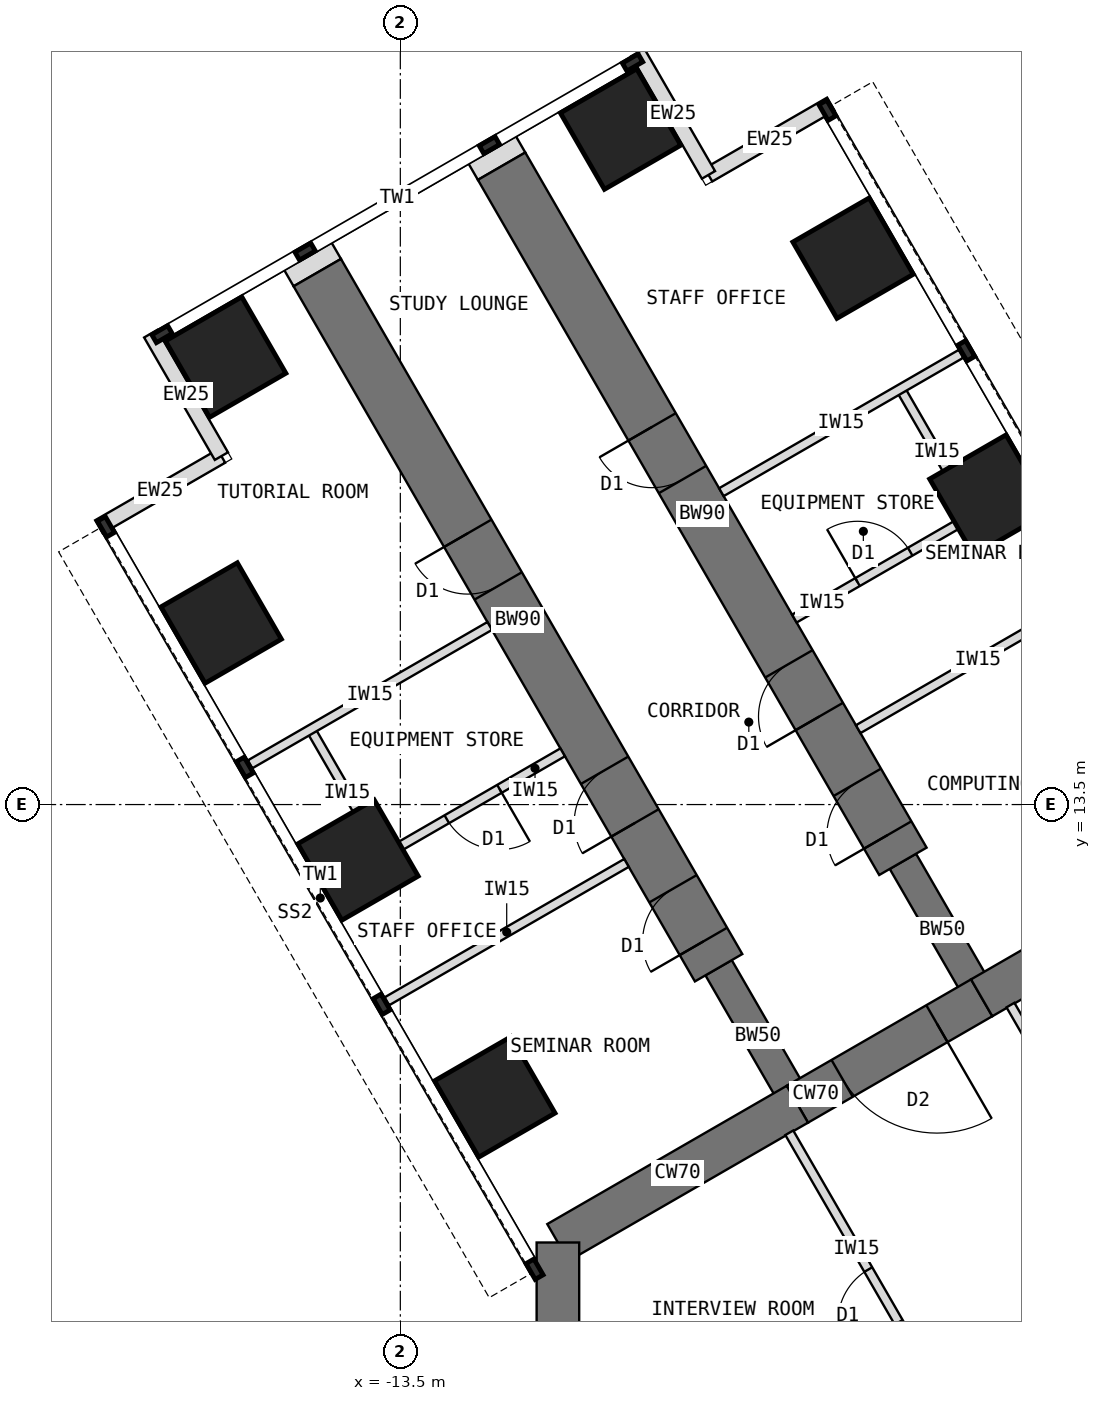
"""IFC4 building model, lengths in metres.
Left out: names, types, materials, properties, quantities, classifications, styles, units other than length and angle.
Written with IfcOpenShell. Run it as: python <this file> out.ifc"""

import sys

from ifc_helpers import new_model, si_unit, direction, frame, frame_2d, origin, origin_2d, place, context, subcontext, project, spatial, rectangle, extrude, element, fill, save


model = new_model("IFC4")
c1 = context("Model", 3, precision=1e-05, world=origin(), true_north=direction((0.0, 1.0)))
c2 = subcontext(c1, "Body", "Model", "MODEL_VIEW")
j1 = project(units=[si_unit("LENGTHUNIT", "METRE"), si_unit("PLANEANGLEUNIT", "RADIAN")], contexts=[c1])
p1 = place(None, origin())
s1 = spatial("IfcSite", under=j1, at=p1, CompositionType="ELEMENT")
p2 = place(p1, origin())
s2 = spatial("IfcBuilding", under=s1, at=p2, CompositionType="ELEMENT")
p3 = place(p2, frame((0.0, 0.0, 64.5)))
s3 = spatial("IfcBuildingStorey", under=s2, at=p3, CompositionType="ELEMENT", Elevation=64.5)
p4 = place(p3, frame((0.0, 12.596, 0.0), z_axis=(0.0, 0.0, 1.0), x_axis=(-0.866011268655, -0.500024481964, 0.0)))
e1 = element("IfcWall", 1, at=p4, inside=s3, PredefinedType="SHEAR", context=c2, shape_type="SweptSolid", body=[
    extrude(rectangle(XDim=4.548, YDim=0.7, at=frame_2d((2.274, 0.0))), origin(), (0.0, 0.0, 1.0), 4.0),
])
p5 = place(p3, frame((-3.939, 10.322, 0.0), z_axis=(0.0, 0.0, 1.0), x_axis=(-0.866019471182, -0.500010275428, 0.0)))
e2 = element("IfcWall", 2, at=p5, inside=s3, PredefinedType="SHEAR", context=c2, shape_type="SweptSolid", body=[
    extrude(rectangle(XDim=3.5, YDim=0.7, at=frame_2d((1.75, 0.0))), origin(), (0.0, 0.0, 1.0), 4.0),
])
p6 = place(p5, frame((0.85, 0.0, 0.0)))
e3 = element("IfcOpeningElement", 3, at=p6, cuts=e2, PredefinedType="OPENING", context=c2, shape_type="SweptSolid", body=[
    extrude(rectangle(XDim=1.8, YDim=2.1, at=frame_2d((0.9, 1.05))), frame((0.0, 0.36, 0.0), z_axis=(0.0, -1.0, 0.0), x_axis=(1.0, 0.0, 0.0)), (0.0, 0.0, 1.0), 0.72),
])
p7 = place(p3, frame((-6.97, 8.572, 0.0), z_axis=(0.0, 0.0, 1.0), x_axis=(-0.866034513004, -0.499984222037, 0.0)))
e4 = element("IfcWall", 4, at=p7, inside=s3, PredefinedType="SHEAR", context=c2, shape_type="SweptSolid", body=[
    extrude(rectangle(XDim=4.548, YDim=0.7, at=frame_2d((2.274, 0.0))), origin(), (0.0, 0.0, 1.0), 4.0),
])
p8 = place(p3, frame((-10.908, 6.298, 0.0), z_axis=(0.0, 0.0, 1.0), x_axis=(0.0, -1.0, 0.0)))
e5 = element("IfcWall", 5, at=p8, inside=s3, PredefinedType="SHEAR", context=c2, shape_type="SweptSolid", body=[
    extrude(rectangle(XDim=12.596, YDim=0.7, at=frame_2d((6.298, 0.0))), origin(), (0.0, 0.0, 1.0), 4.0),
])
p9 = place(p3, frame((-6.97, 8.572, 0.0), z_axis=(0.0, 0.0, 1.0), x_axis=(-0.499988811324, 0.866031863473, 0.0)))
e6 = element("IfcWall", 6, at=p9, inside=s3, PredefinedType="SHEAR", context=c2, shape_type="SweptSolid", body=[
    extrude(rectangle(XDim=2.592, YDim=0.5, at=frame_2d((1.296, 0.0))), origin(), (0.0, 0.0, 1.0), 4.0),
])
p10 = place(p3, frame((-8.266, 10.816, 0.0), z_axis=(0.0, 0.0, 1.0), x_axis=(-0.499996231654, 0.866027579429, 0.0)))
e7 = element("IfcWall", 7, at=p10, inside=s3, PredefinedType="SHEAR", context=c2, shape_type="SweptSolid", body=[
    extrude(rectangle(XDim=13.2, YDim=0.9, at=frame_2d((6.6, 0.0))), origin(), (0.0, 0.0, 1.0), 4.0),
])
p11 = place(p10, frame((0.5, 0.0, 0.0)))
e8 = element("IfcOpeningElement", 8, at=p11, cuts=e7, PredefinedType="OPENING", context=c2, shape_type="SweptSolid", body=[
    extrude(rectangle(XDim=1.0, YDim=2.1, at=frame_2d((0.5, 1.05))), frame((0.0, 0.46, 0.0), z_axis=(0.0, -1.0, 0.0), x_axis=(1.0, 0.0, 0.0)), (0.0, 0.0, 1.0), 0.92),
])
p12 = place(p10, frame((2.75, 0.0, 0.0)))
e9 = element("IfcOpeningElement", 9, at=p12, cuts=e7, PredefinedType="OPENING", context=c2, shape_type="SweptSolid", body=[
    extrude(rectangle(XDim=1.0, YDim=2.1, at=frame_2d((0.5, 1.05))), frame((0.0, 0.46, 0.0), z_axis=(0.0, -1.0, 0.0), x_axis=(1.0, 0.0, 0.0)), (0.0, 0.0, 1.0), 0.92),
])
p13 = place(p10, frame((7.25, 0.0, 0.0)))
e10 = element("IfcOpeningElement", 10, at=p13, cuts=e7, PredefinedType="OPENING", context=c2, shape_type="SweptSolid", body=[
    extrude(rectangle(XDim=1.0, YDim=2.1, at=frame_2d((0.5, 1.05))), frame((0.0, 0.46, 0.0), z_axis=(0.0, -1.0, 0.0), x_axis=(1.0, 0.0, 0.0)), (0.0, 0.0, 1.0), 0.92),
])
p14 = place(p3, frame((-3.939, 10.322, 0.0), z_axis=(0.0, 0.0, 1.0), x_axis=(-0.499918158782, 0.866072649678, 0.0)))
e11 = element("IfcWall", 11, at=p14, inside=s3, PredefinedType="SHEAR", context=c2, shape_type="SweptSolid", body=[
    extrude(rectangle(XDim=2.592, YDim=0.5, at=frame_2d((1.296, 0.0))), origin(), (0.0, 0.0, 1.0), 4.0),
])
p15 = place(p3, frame((-5.234, 12.566, 0.0), z_axis=(0.0, 0.0, 1.0), x_axis=(-0.500010103361, 0.866019570528, 0.0)))
e12 = element("IfcWall", 12, at=p15, inside=s3, PredefinedType="SHEAR", context=c2, shape_type="SweptSolid", body=[
    extrude(rectangle(XDim=13.2, YDim=0.9, at=frame_2d((6.6, 0.0))), origin(), (0.0, 0.0, 1.0), 4.0),
])
p16 = place(p15, frame((0.5, 0.0, 0.0)))
e13 = element("IfcOpeningElement", 13, at=p16, cuts=e12, PredefinedType="OPENING", context=c2, shape_type="SweptSolid", body=[
    extrude(rectangle(XDim=1.0, YDim=2.1, at=frame_2d((0.5, 1.05))), frame((0.0, 0.46, 0.0), z_axis=(0.0, -1.0, 0.0), x_axis=(1.0, 0.0, 0.0)), (0.0, 0.0, 1.0), 0.92),
])
p17 = place(p15, frame((2.75, 0.0, 0.0)))
e14 = element("IfcOpeningElement", 14, at=p17, cuts=e12, PredefinedType="OPENING", context=c2, shape_type="SweptSolid", body=[
    extrude(rectangle(XDim=1.0, YDim=2.1, at=frame_2d((0.5, 1.05))), frame((0.0, 0.46, 0.0), z_axis=(0.0, -1.0, 0.0), x_axis=(1.0, 0.0, 0.0)), (0.0, 0.0, 1.0), 0.92),
])
p18 = place(p15, frame((7.25, 0.0, 0.0)))
e15 = element("IfcOpeningElement", 15, at=p18, cuts=e12, PredefinedType="OPENING", context=c2, shape_type="SweptSolid", body=[
    extrude(rectangle(XDim=1.0, YDim=2.1, at=frame_2d((0.5, 1.05))), frame((0.0, 0.46, 0.0), z_axis=(0.0, -1.0, 0.0), x_axis=(1.0, 0.0, 0.0)), (0.0, 0.0, 1.0), 0.92),
])
for number, where, z_axis, x_axis in (
    (16, (-11.946, 8.691, 0.0), (0.0, 0.0, 1.0), (0.866, 0.5, 0.0)),
    (17, (-14.196, 12.588, 0.0), (0.0, 0.0, 1.0), (0.866, 0.5, 0.0)),
    (18, (-3.804, 18.588, 0.0), (0.0, 0.0, 1.0), (0.866, 0.5, 0.0)),
    (19, (-16.446, 16.486, 0.0), (0.0, 0.0, 1.0), (0.866, 0.5, 0.0)),
    (20, (-6.054, 22.486, 0.0), (0.0, 0.0, 1.0), (0.866, 0.5, 0.0)),
    (21, (-16.373, 20.858, 0.0), (0.0, 0.0, 1.0), (0.866, 0.5, 0.0)),
    (22, (-9.877, 24.608, 0.0), (0.0, 0.0, 1.0), (0.866, 0.5, 0.0)),
):
    element("IfcColumn", number, at=place(p3, frame(where, z_axis=z_axis, x_axis=x_axis)), inside=s3, PredefinedType="COLUMN", context=c2, shape_type="SweptSolid", body=[
        extrude(rectangle(XDim=1.45, YDim=1.45, at=origin_2d()), origin(), (0.0, 0.0, 1.0), 4.0),
    ])
for number, where, z_axis, x_axis in (
    (23, (-18.456, 18.067, 0.0), (0.0, 0.0, 1.0), (0.866, 0.5, 0.0)),
    (24, (-16.443, 19.23, 0.0), (0.0, 0.0, 1.0), (-0.5, 0.866, 0.0)),
    (25, (-6.419, 25.017, 0.0), (0.0, 0.0, 1.0), (-0.866, -0.5, 0.0)),
    (26, (-8.432, 23.855, 0.0), (0.0, 0.0, 1.0), (-0.5, 0.866, 0.0)),
):
    element("IfcWall", number, at=place(p3, frame(where, z_axis=z_axis, x_axis=x_axis)), inside=s3, PredefinedType="STANDARD", context=c2, shape_type="SweptSolid", body=[
        extrude(rectangle(XDim=2.325, YDim=0.25, at=frame_2d((1.163, 0.0))), origin(), (0.0, 0.0, 1.0), 3.8),
    ])
for number, where, z_axis, x_axis in (
    (27, (-14.865, 22.248, 0.0), (0.0, 0.0, 1.0), (-0.5, 0.866, 0.0)),
    (28, (-11.834, 23.998, 0.0), (0.0, 0.0, 1.0), (-0.5, 0.866, 0.0)),
):
    element("IfcWall", number, at=place(p3, frame(where, z_axis=z_axis, x_axis=x_axis)), inside=s3, PredefinedType="PARTITIONING", context=c2, shape_type="SweptSolid", body=[
        extrude(rectangle(XDim=0.31, YDim=0.9, at=frame_2d((0.155, 0.0))), origin(), (0.0, 0.0, 1.0), 3.8),
    ])
for number, where, z_axis, x_axis in (
    (29, (-9.78, 12.54, 0.0), (0.0, 0.0, 1.0), (-0.866, -0.5, 0.0)),
    (30, (-12.03, 16.437, 0.0), (0.0, 0.0, 1.0), (-0.866, -0.5, 0.0)),
):
    element("IfcWall", number, at=place(p3, frame(where, z_axis=z_axis, x_axis=x_axis)), inside=s3, PredefinedType="PARTITIONING", context=c2, shape_type="SweptSolid", body=[
        extrude(rectangle(XDim=4.55, YDim=0.15, at=frame_2d((2.275, 0.0))), origin(), (0.0, 0.0, 1.0), 3.8),
    ])
p19 = place(p3, frame((-13.775, 12.658, 0.0), z_axis=(0.0, 0.0, 1.0), x_axis=(-0.500033551112, 0.866006032174, 0.0)))
e31 = element("IfcWall", 31, at=p19, inside=s3, PredefinedType="PARTITIONING", context=c2, shape_type="SweptSolid", body=[
    extrude(rectangle(XDim=2.4, YDim=0.15, at=frame_2d((1.2, 0.0))), origin(), (0.0, 0.0, 1.0), 3.8),
])
p20 = place(p3, frame((-10.83, 14.359, 0.0), z_axis=(0.0, 0.0, 1.0), x_axis=(-0.865989465428, -0.500062241894, 0.0)))
e32 = element("IfcWall", 32, at=p20, inside=s3, PredefinedType="PARTITIONING", context=c2, shape_type="SweptSolid", body=[
    extrude(rectangle(XDim=3.4, YDim=0.15, at=frame_2d((1.7, 0.0))), origin(), (0.0, 0.0, 1.0), 3.8),
])
p21 = place(p20, frame((1.2, 0.0, 0.0)))
e33 = element("IfcOpeningElement", 33, at=p21, cuts=e32, PredefinedType="OPENING", context=c2, shape_type="SweptSolid", body=[
    extrude(rectangle(XDim=1.0, YDim=2.1, at=frame_2d((0.5, 1.05))), frame((0.0, 0.085, 0.0), z_axis=(0.0, -1.0, 0.0), x_axis=(1.0, 0.0, 0.0)), (0.0, 0.0, 1.0), 0.17),
])
for number, where, z_axis, x_axis in (
    (34, (-5.97, 14.74, 0.0), (0.0, 0.0, 1.0), (0.866, 0.5, 0.0)),
    (35, (-8.22, 18.637, 0.0), (0.0, 0.0, 1.0), (0.866, 0.5, 0.0)),
):
    element("IfcWall", number, at=place(p3, frame(where, z_axis=z_axis, x_axis=x_axis)), inside=s3, PredefinedType="PARTITIONING", context=c2, shape_type="SweptSolid", body=[
        extrude(rectangle(XDim=4.55, YDim=0.15, at=frame_2d((2.275, 0.0))), origin(), (0.0, 0.0, 1.0), 3.8),
    ])
p22 = place(p3, frame((-4.075, 18.259, 0.0), z_axis=(0.0, 0.0, 1.0), x_axis=(-0.500001309137, 0.866024647952, 0.0)))
e36 = element("IfcWall", 36, at=p22, inside=s3, PredefinedType="PARTITIONING", context=c2, shape_type="SweptSolid", body=[
    extrude(rectangle(XDim=2.4, YDim=0.15, at=frame_2d((1.2, 0.0))), origin(), (0.0, 0.0, 1.0), 3.8),
])
p23 = place(p3, frame((-7.02, 16.559, 0.0), z_axis=(0.0, 0.0, 1.0), x_axis=(0.866038511948, 0.499977295307, 0.0)))
e37 = element("IfcWall", 37, at=p23, inside=s3, PredefinedType="PARTITIONING", context=c2, shape_type="SweptSolid", body=[
    extrude(rectangle(XDim=3.4, YDim=0.15, at=frame_2d((1.7, 0.0))), origin(), (0.0, 0.0, 1.0), 3.8),
])
p24 = place(p23, frame((1.2, 0.0, 0.0)))
e38 = element("IfcOpeningElement", 38, at=p24, cuts=e37, PredefinedType="OPENING", context=c2, shape_type="SweptSolid", body=[
    extrude(rectangle(XDim=1.0, YDim=2.1, at=frame_2d((0.5, 1.05))), frame((0.0, 0.085, 0.0), z_axis=(0.0, -1.0, 0.0), x_axis=(1.0, 0.0, 0.0)), (0.0, 0.0, 1.0), 0.17),
])
p25 = place(p3, frame((-4.89, 4.27, 0.0), z_axis=(0.0, 0.0, 1.0), x_axis=(-0.500007369519, 0.866021148949, 0.0)))
e39 = element("IfcWall", 39, at=p25, inside=s3, PredefinedType="PARTITIONING", context=c2, shape_type="SweptSolid", body=[
    extrude(rectangle(XDim=4.426, YDim=0.15, at=frame_2d((2.213, 0.0))), origin(), (0.0, 0.0, 1.0), 3.8),
])
p26 = place(p25, frame((0.828, 0.0, 0.0)))
e40 = element("IfcOpeningElement", 40, at=p26, cuts=e39, PredefinedType="OPENING", context=c2, shape_type="SweptSolid", body=[
    extrude(rectangle(XDim=1.0, YDim=2.1, at=frame_2d((0.5, 1.05))), frame((0.0, 0.085, 0.0), z_axis=(0.0, -1.0, 0.0), x_axis=(1.0, 0.0, 0.0)), (0.0, 0.0, 1.0), 0.17),
])
p27 = place(p3, frame((-3.466, 10.202, 0.0), z_axis=(0.0, 0.0, 1.0), x_axis=(0.500007369519, -0.866021148949, 0.0)))
e41 = element("IfcWall", 41, at=p27, inside=s3, PredefinedType="PARTITIONING", context=c2, shape_type="SweptSolid", body=[
    extrude(rectangle(XDim=4.426, YDim=0.15, at=frame_2d((2.213, 0.0))), origin(), (0.0, 0.0, 1.0), 3.8),
])
p28 = place(p27, frame((0.828, 0.0, 0.0)))
e42 = element("IfcOpeningElement", 42, at=p28, cuts=e41, PredefinedType="OPENING", context=c2, shape_type="SweptSolid", body=[
    extrude(rectangle(XDim=1.0, YDim=2.1, at=frame_2d((0.5, 1.05))), frame((0.0, 0.085, 0.0), z_axis=(0.0, -1.0, 0.0), x_axis=(1.0, 0.0, 0.0)), (0.0, 0.0, 1.0), 0.17),
])
p29 = place(p6, origin())
e43 = element("IfcDoor", 43, at=p29, inside=s3, OperationType="DOUBLE_DOOR_DOUBLE_SWING", PredefinedType="DOOR", context=c2, shape_type="SweptSolid", body=[
    extrude(rectangle(XDim=1.72, YDim=2.06, at=frame_2d((0.9, 1.03))), frame((0.0, 0.025, 0.0), z_axis=(0.0, -1.0, 0.0), x_axis=(1.0, 0.0, 0.0)), (0.0, 0.0, 1.0), 0.05),
    extrude(rectangle(XDim=0.04, YDim=2.1, at=frame_2d((0.02, 1.05))), frame((0.0, 0.35, 0.0), z_axis=(0.0, -1.0, 0.0), x_axis=(1.0, 0.0, 0.0)), (0.0, 0.0, 1.0), 0.699),
    extrude(rectangle(XDim=0.04, YDim=2.1, at=frame_2d((1.78, 1.05))), frame((0.0, 0.35, 0.0), z_axis=(0.0, -1.0, 0.0), x_axis=(1.0, 0.0, 0.0)), (0.0, 0.0, 1.0), 0.699),
    extrude(rectangle(XDim=1.72, YDim=0.04, at=frame_2d((0.9, 2.08))), frame((0.0, 0.35, 0.0), z_axis=(0.0, -1.0, 0.0), x_axis=(1.0, 0.0, 0.0)), (0.0, 0.0, 1.0), 0.699),
])
fill(e3, e43)
p30 = place(p21, origin())
e44 = element("IfcDoor", 44, at=p30, inside=s3, OperationType="SINGLE_SWING_LEFT", PredefinedType="DOOR", context=c2, shape_type="SweptSolid", body=[
    extrude(rectangle(XDim=1.0, YDim=2.1, at=frame_2d((0.5, 1.05))), frame((0.0, 0.025, 0.0), z_axis=(0.0, -1.0, 0.0), x_axis=(1.0, 0.0, 0.0)), (0.0, 0.0, 1.0), 0.05),
])
fill(e33, e44)
p31 = place(p24, origin())
e45 = element("IfcDoor", 45, at=p31, inside=s3, OperationType="SINGLE_SWING_LEFT", PredefinedType="DOOR", context=c2, shape_type="SweptSolid", body=[
    extrude(rectangle(XDim=1.0, YDim=2.1, at=frame_2d((0.5, 1.05))), frame((0.0, 0.025, 0.0), z_axis=(0.0, -1.0, 0.0), x_axis=(1.0, 0.0, 0.0)), (0.0, 0.0, 1.0), 0.05),
])
fill(e38, e45)
p32 = place(p26, origin())
e46 = element("IfcDoor", 46, at=p32, inside=s3, OperationType="SINGLE_SWING_LEFT", PredefinedType="DOOR", context=c2, shape_type="SweptSolid", body=[
    extrude(rectangle(XDim=1.0, YDim=2.1, at=frame_2d((0.5, 1.05))), frame((0.0, 0.025, 0.0), z_axis=(0.0, -1.0, 0.0), x_axis=(1.0, 0.0, 0.0)), (0.0, 0.0, 1.0), 0.05),
])
fill(e40, e46)
p33 = place(p11, origin())
e47 = element("IfcDoor", 47, at=p33, inside=s3, OperationType="SINGLE_SWING_LEFT", PredefinedType="DOOR", context=c2, shape_type="SweptSolid", body=[
    extrude(rectangle(XDim=0.92, YDim=2.06, at=frame_2d((0.5, 1.03))), frame((0.0, 0.025, 0.0), z_axis=(0.0, -1.0, 0.0), x_axis=(1.0, 0.0, 0.0)), (0.0, 0.0, 1.0), 0.05),
    extrude(rectangle(XDim=0.04, YDim=2.1, at=frame_2d((0.02, 1.05))), frame((0.0, 0.45, 0.0), z_axis=(0.0, -1.0, 0.0), x_axis=(1.0, 0.0, 0.0)), (0.0, 0.0, 1.0), 0.899),
    extrude(rectangle(XDim=0.04, YDim=2.1, at=frame_2d((0.98, 1.05))), frame((0.0, 0.45, 0.0), z_axis=(0.0, -1.0, 0.0), x_axis=(1.0, 0.0, 0.0)), (0.0, 0.0, 1.0), 0.899),
    extrude(rectangle(XDim=0.92, YDim=0.04, at=frame_2d((0.5, 2.08))), frame((0.0, 0.45, 0.0), z_axis=(0.0, -1.0, 0.0), x_axis=(1.0, 0.0, 0.0)), (0.0, 0.0, 1.0), 0.899),
])
fill(e8, e47)
p34 = place(p12, origin())
e48 = element("IfcDoor", 48, at=p34, inside=s3, OperationType="SINGLE_SWING_LEFT", PredefinedType="DOOR", context=c2, shape_type="SweptSolid", body=[
    extrude(rectangle(XDim=0.92, YDim=2.06, at=frame_2d((0.5, 1.03))), frame((0.0, 0.025, 0.0), z_axis=(0.0, -1.0, 0.0), x_axis=(1.0, 0.0, 0.0)), (0.0, 0.0, 1.0), 0.05),
    extrude(rectangle(XDim=0.04, YDim=2.1, at=frame_2d((0.02, 1.05))), frame((0.0, 0.45, 0.0), z_axis=(0.0, -1.0, 0.0), x_axis=(1.0, 0.0, 0.0)), (0.0, 0.0, 1.0), 0.899),
    extrude(rectangle(XDim=0.04, YDim=2.1, at=frame_2d((0.98, 1.05))), frame((0.0, 0.45, 0.0), z_axis=(0.0, -1.0, 0.0), x_axis=(1.0, 0.0, 0.0)), (0.0, 0.0, 1.0), 0.899),
    extrude(rectangle(XDim=0.92, YDim=0.04, at=frame_2d((0.5, 2.08))), frame((0.0, 0.45, 0.0), z_axis=(0.0, -1.0, 0.0), x_axis=(1.0, 0.0, 0.0)), (0.0, 0.0, 1.0), 0.899),
])
fill(e9, e48)
p35 = place(p13, origin())
e49 = element("IfcDoor", 49, at=p35, inside=s3, OperationType="SINGLE_SWING_RIGHT", PredefinedType="DOOR", context=c2, shape_type="SweptSolid", body=[
    extrude(rectangle(XDim=0.92, YDim=2.06, at=frame_2d((0.5, 1.03))), frame((0.0, 0.025, 0.0), z_axis=(0.0, -1.0, 0.0), x_axis=(1.0, 0.0, 0.0)), (0.0, 0.0, 1.0), 0.05),
    extrude(rectangle(XDim=0.04, YDim=2.1, at=frame_2d((0.02, 1.05))), frame((0.0, 0.45, 0.0), z_axis=(0.0, -1.0, 0.0), x_axis=(1.0, 0.0, 0.0)), (0.0, 0.0, 1.0), 0.899),
    extrude(rectangle(XDim=0.04, YDim=2.1, at=frame_2d((0.98, 1.05))), frame((0.0, 0.45, 0.0), z_axis=(0.0, -1.0, 0.0), x_axis=(1.0, 0.0, 0.0)), (0.0, 0.0, 1.0), 0.899),
    extrude(rectangle(XDim=0.92, YDim=0.04, at=frame_2d((0.5, 2.08))), frame((0.0, 0.45, 0.0), z_axis=(0.0, -1.0, 0.0), x_axis=(1.0, 0.0, 0.0)), (0.0, 0.0, 1.0), 0.899),
])
fill(e10, e49)
p36 = place(p16, origin())
e50 = element("IfcDoor", 50, at=p36, inside=s3, OperationType="SINGLE_SWING_LEFT", PredefinedType="DOOR", context=c2, shape_type="SweptSolid", body=[
    extrude(rectangle(XDim=0.92, YDim=2.06, at=frame_2d((0.5, 1.03))), frame((0.0, 0.025, 0.0), z_axis=(0.0, -1.0, 0.0), x_axis=(1.0, 0.0, 0.0)), (0.0, 0.0, 1.0), 0.05),
    extrude(rectangle(XDim=0.04, YDim=2.1, at=frame_2d((0.02, 1.05))), frame((0.0, 0.45, 0.0), z_axis=(0.0, -1.0, 0.0), x_axis=(1.0, 0.0, 0.0)), (0.0, 0.0, 1.0), 0.899),
    extrude(rectangle(XDim=0.04, YDim=2.1, at=frame_2d((0.98, 1.05))), frame((0.0, 0.45, 0.0), z_axis=(0.0, -1.0, 0.0), x_axis=(1.0, 0.0, 0.0)), (0.0, 0.0, 1.0), 0.899),
    extrude(rectangle(XDim=0.92, YDim=0.04, at=frame_2d((0.5, 2.08))), frame((0.0, 0.45, 0.0), z_axis=(0.0, -1.0, 0.0), x_axis=(1.0, 0.0, 0.0)), (0.0, 0.0, 1.0), 0.899),
])
fill(e13, e50)
p37 = place(p17, origin())
e51 = element("IfcDoor", 51, at=p37, inside=s3, OperationType="SINGLE_SWING_LEFT", PredefinedType="DOOR", context=c2, shape_type="SweptSolid", body=[
    extrude(rectangle(XDim=0.92, YDim=2.06, at=frame_2d((0.5, 1.03))), frame((0.0, 0.025, 0.0), z_axis=(0.0, -1.0, 0.0), x_axis=(1.0, 0.0, 0.0)), (0.0, 0.0, 1.0), 0.05),
    extrude(rectangle(XDim=0.04, YDim=2.1, at=frame_2d((0.02, 1.05))), frame((0.0, 0.45, 0.0), z_axis=(0.0, -1.0, 0.0), x_axis=(1.0, 0.0, 0.0)), (0.0, 0.0, 1.0), 0.899),
    extrude(rectangle(XDim=0.04, YDim=2.1, at=frame_2d((0.98, 1.05))), frame((0.0, 0.45, 0.0), z_axis=(0.0, -1.0, 0.0), x_axis=(1.0, 0.0, 0.0)), (0.0, 0.0, 1.0), 0.899),
    extrude(rectangle(XDim=0.92, YDim=0.04, at=frame_2d((0.5, 2.08))), frame((0.0, 0.45, 0.0), z_axis=(0.0, -1.0, 0.0), x_axis=(1.0, 0.0, 0.0)), (0.0, 0.0, 1.0), 0.899),
])
fill(e14, e51)
p38 = place(p18, origin())
e52 = element("IfcDoor", 52, at=p38, inside=s3, OperationType="SINGLE_SWING_RIGHT", PredefinedType="DOOR", context=c2, shape_type="SweptSolid", body=[
    extrude(rectangle(XDim=0.92, YDim=2.06, at=frame_2d((0.5, 1.03))), frame((0.0, 0.025, 0.0), z_axis=(0.0, -1.0, 0.0), x_axis=(1.0, 0.0, 0.0)), (0.0, 0.0, 1.0), 0.05),
    extrude(rectangle(XDim=0.04, YDim=2.1, at=frame_2d((0.02, 1.05))), frame((0.0, 0.45, 0.0), z_axis=(0.0, -1.0, 0.0), x_axis=(1.0, 0.0, 0.0)), (0.0, 0.0, 1.0), 0.899),
    extrude(rectangle(XDim=0.04, YDim=2.1, at=frame_2d((0.98, 1.05))), frame((0.0, 0.45, 0.0), z_axis=(0.0, -1.0, 0.0), x_axis=(1.0, 0.0, 0.0)), (0.0, 0.0, 1.0), 0.899),
    extrude(rectangle(XDim=0.92, YDim=0.04, at=frame_2d((0.5, 2.08))), frame((0.0, 0.45, 0.0), z_axis=(0.0, -1.0, 0.0), x_axis=(1.0, 0.0, 0.0)), (0.0, 0.0, 1.0), 0.899),
])
fill(e15, e52)
save(model, sys.argv[1])
